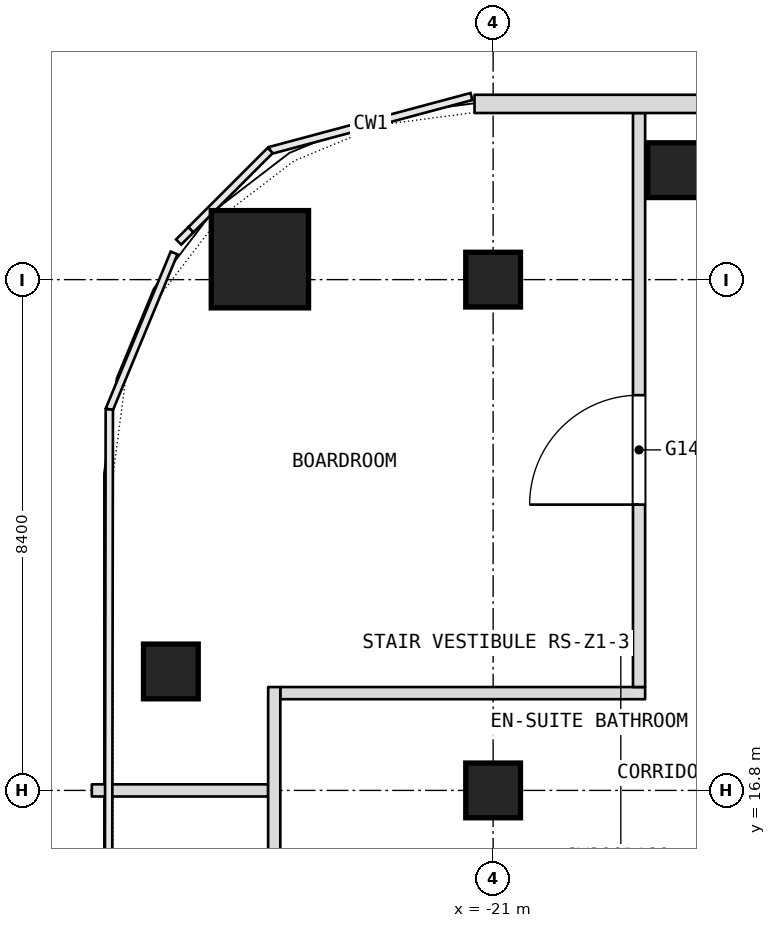
"""IFC4 building model, lengths in metres.
Left out: names, types, materials, properties, quantities, classifications, styles, units other than length and angle.
Written with IfcOpenShell. Run it as: python <this file> out.ifc"""

import sys

from ifc_helpers import new_model, si_unit, direction, frame, frame_2d, origin, origin_2d, place, context, subcontext, project, spatial, rectangle, extrude, element, fill, save


model = new_model("IFC4")
c1 = context("Model", 3, precision=1e-05, world=origin(), true_north=direction((0.0, 1.0)))
c2 = subcontext(c1, "Body", "Model", "MODEL_VIEW")
j1 = project(units=[si_unit("LENGTHUNIT", "METRE"), si_unit("PLANEANGLEUNIT", "RADIAN")], contexts=[c1])
p1 = place(None, origin())
s1 = spatial("IfcSite", under=j1, at=p1, CompositionType="ELEMENT")
p2 = place(p1, origin())
s2 = spatial("IfcBuilding", under=s1, at=p2, CompositionType="ELEMENT")
p3 = place(p2, frame((0.0, 0.0, 166.1)))
s3 = spatial("IfcBuildingStorey", under=s2, at=p3, CompositionType="ELEMENT", Elevation=166.1)
p4 = place(p3, frame((-24.835, 25.535, 0.0), z_axis=(0.0, 0.0, 1.0), x_axis=(1.0, 0.0, 0.0)))
e1 = element("IfcColumn", 1, at=p4, inside=s3, PredefinedType="COLUMN", context=c2, shape_type="SweptSolid", body=[
    extrude(rectangle(XDim=1.6, YDim=1.6, at=origin_2d()), origin(), (0.0, 0.0, 1.0), 3.6),
])
for number, where, z_axis, x_axis in (
    (2, (-21.0, 16.8, 0.0), (0.0, 0.0, 1.0), (1.0, 0.0, 0.0)),
    (3, (-21.0, 25.2, 0.0), (0.0, 0.0, 1.0), (1.0, 0.0, 0.0)),
    (4, (-26.3, 18.756, 0.0), (0.0, 0.0, 1.0), (1.0, 0.0, 0.0)),
    (5, (-18.007, 27.0, 0.0), (0.0, 0.0, 1.0), (1.0, 0.0, 0.0)),
):
    element("IfcColumn", number, at=place(p3, frame(where, z_axis=z_axis, x_axis=x_axis)), inside=s3, PredefinedType="COLUMN", context=c2, shape_type="SweptSolid", body=[
        extrude(rectangle(XDim=0.9, YDim=0.9, at=origin_2d()), origin(), (0.0, 0.0, 1.0), 3.6),
    ])
p5 = place(p3, frame((-27.6, 16.8, 0.0), z_axis=(0.0, 0.0, 1.0), x_axis=(1.0, 0.0, 0.0)))
e6 = element("IfcWall", 6, at=p5, inside=s3, PredefinedType="PARTITIONING", context=c2, shape_type="SweptSolid", body=[
    extrude(rectangle(XDim=2.9, YDim=0.2, at=frame_2d((1.45, 0.0))), origin(), (0.0, 0.0, 1.0), 2.85),
])
p6 = place(p3, frame((-24.5, 18.4, 0.0), z_axis=(0.0, 0.0, 1.0), x_axis=(1.0, 0.0, 0.0)))
e7 = element("IfcWall", 7, at=p6, inside=s3, PredefinedType="PARTITIONING", context=c2, shape_type="SweptSolid", body=[
    extrude(rectangle(XDim=6.0, YDim=0.2, at=frame_2d((3.0, 0.0))), origin(), (0.0, 0.0, 1.0), 3.3),
])
p7 = place(p3, frame((-18.6, 18.5, 0.0), z_axis=(0.0, 0.0, 1.0), x_axis=(0.0, 1.0, 0.0)))
e8 = element("IfcWall", 8, at=p7, inside=s3, PredefinedType="PARTITIONING", context=c2, shape_type="SweptSolid", body=[
    extrude(rectangle(XDim=9.44, YDim=0.2, at=frame_2d((4.72, 0.0))), origin(), (0.0, 0.0, 1.0), 3.3),
])
p8 = place(p7, frame((3.0, 0.0, 0.0)))
e9 = element("IfcOpeningElement", 9, at=p8, cuts=e8, PredefinedType="OPENING", context=c2, shape_type="SweptSolid", body=[
    extrude(rectangle(XDim=1.8, YDim=2.1, at=frame_2d((0.9, 1.05))), frame((0.0, 0.1, 0.0), z_axis=(0.0, -1.0, 0.0), x_axis=(1.0, 0.0, 0.0)), (0.0, 0.0, 1.0), 0.2),
])
p9 = place(p3, frame((-24.6, 6.9, 0.0), z_axis=(0.0, 0.0, 1.0), x_axis=(0.0, 1.0, 0.0)))
e10 = element("IfcWall", 10, at=p9, inside=s3, PredefinedType="PARTITIONING", context=c2, shape_type="SweptSolid", body=[
    extrude(rectangle(XDim=11.6, YDim=0.2, at=frame_2d((5.8, 0.0))), origin(), (0.0, 0.0, 1.0), 3.3),
])
p10 = place(p9, frame((5.45, 0.0, 0.0)))
e11 = element("IfcOpeningElement", 11, at=p10, cuts=e10, PredefinedType="OPENING", context=c2, shape_type="SweptSolid", body=[
    extrude(rectangle(XDim=1.8, YDim=2.1, at=frame_2d((0.9, 1.05))), frame((0.0, 0.1, 0.0), z_axis=(0.0, -1.0, 0.0), x_axis=(1.0, 0.0, 0.0)), (0.0, 0.0, 1.0), 0.2),
])
p11 = place(p3, frame((21.306, 28.09, 0.0), z_axis=(0.0, 0.0, 1.0), x_axis=(-1.0, 0.0, 0.0)))
e12 = element("IfcWall", 12, at=p11, inside=s3, PredefinedType="NOTDEFINED", context=c2, shape_type="SweptSolid", body=[
    extrude(rectangle(XDim=42.612, YDim=0.3, at=frame_2d((21.306, 0.0))), origin(), (0.0, 0.0, 1.0), 3.6),
])
p12 = place(p11, frame((5.406, 0.0, 0.9)))
e13 = element("IfcOpeningElement", 13, at=p12, cuts=e12, PredefinedType="OPENING", context=c2, shape_type="SweptSolid", body=[
    extrude(rectangle(XDim=2.4, YDim=2.1, at=frame_2d((1.2, 1.05))), frame((0.0, 0.15, 0.0), z_axis=(0.0, -1.0, 0.0), x_axis=(1.0, 0.0, 0.0)), (0.0, 0.0, 1.0), 0.3),
])
p13 = place(p11, frame((9.606, 0.0, 0.9)))
e14 = element("IfcOpeningElement", 14, at=p13, cuts=e12, PredefinedType="OPENING", context=c2, shape_type="SweptSolid", body=[
    extrude(rectangle(XDim=2.4, YDim=2.1, at=frame_2d((1.2, 1.05))), frame((0.0, 0.15, 0.0), z_axis=(0.0, -1.0, 0.0), x_axis=(1.0, 0.0, 0.0)), (0.0, 0.0, 1.0), 0.3),
])
p14 = place(p11, frame((13.806, 0.0, 0.9)))
e15 = element("IfcOpeningElement", 15, at=p14, cuts=e12, PredefinedType="OPENING", context=c2, shape_type="SweptSolid", body=[
    extrude(rectangle(XDim=2.4, YDim=2.1, at=frame_2d((1.2, 1.05))), frame((0.0, 0.15, 0.0), z_axis=(0.0, -1.0, 0.0), x_axis=(1.0, 0.0, 0.0)), (0.0, 0.0, 1.0), 0.3),
])
p15 = place(p11, frame((18.006, 0.0, 0.9)))
e16 = element("IfcOpeningElement", 16, at=p15, cuts=e12, PredefinedType="OPENING", context=c2, shape_type="SweptSolid", body=[
    extrude(rectangle(XDim=2.4, YDim=2.1, at=frame_2d((1.2, 1.05))), frame((0.0, 0.15, 0.0), z_axis=(0.0, -1.0, 0.0), x_axis=(1.0, 0.0, 0.0)), (0.0, 0.0, 1.0), 0.3),
])
p16 = place(p11, frame((22.206, 0.0, 0.9)))
e17 = element("IfcOpeningElement", 17, at=p16, cuts=e12, PredefinedType="OPENING", context=c2, shape_type="SweptSolid", body=[
    extrude(rectangle(XDim=2.4, YDim=2.1, at=frame_2d((1.2, 1.05))), frame((0.0, 0.15, 0.0), z_axis=(0.0, -1.0, 0.0), x_axis=(1.0, 0.0, 0.0)), (0.0, 0.0, 1.0), 0.3),
])
p17 = place(p11, frame((26.406, 0.0, 0.9)))
e18 = element("IfcOpeningElement", 18, at=p17, cuts=e12, PredefinedType="OPENING", context=c2, shape_type="SweptSolid", body=[
    extrude(rectangle(XDim=2.4, YDim=2.1, at=frame_2d((1.2, 1.05))), frame((0.0, 0.15, 0.0), z_axis=(0.0, -1.0, 0.0), x_axis=(1.0, 0.0, 0.0)), (0.0, 0.0, 1.0), 0.3),
])
p18 = place(p11, frame((30.606, 0.0, 0.9)))
e19 = element("IfcOpeningElement", 19, at=p18, cuts=e12, PredefinedType="OPENING", context=c2, shape_type="SweptSolid", body=[
    extrude(rectangle(XDim=2.4, YDim=2.1, at=frame_2d((1.2, 1.05))), frame((0.0, 0.15, 0.0), z_axis=(0.0, -1.0, 0.0), x_axis=(1.0, 0.0, 0.0)), (0.0, 0.0, 1.0), 0.3),
])
p19 = place(p11, frame((34.806, 0.0, 0.9)))
e20 = element("IfcOpeningElement", 20, at=p19, cuts=e12, PredefinedType="OPENING", context=c2, shape_type="SweptSolid", body=[
    extrude(rectangle(XDim=2.4, YDim=2.1, at=frame_2d((1.2, 1.05))), frame((0.0, 0.15, 0.0), z_axis=(0.0, -1.0, 0.0), x_axis=(1.0, 0.0, 0.0)), (0.0, 0.0, 1.0), 0.3),
])
p20 = place(p8, origin())
e21 = element("IfcDoor", 21, at=p20, inside=s3, OperationType="DOUBLE_DOOR_SINGLE_SWING", PredefinedType="DOOR", context=c2, shape_type="SweptSolid", body=[
    extrude(rectangle(XDim=1.8, YDim=2.1, at=frame_2d((0.9, 1.05))), frame((0.0, 0.025, 0.0), z_axis=(0.0, -1.0, 0.0), x_axis=(1.0, 0.0, 0.0)), (0.0, 0.0, 1.0), 0.05),
])
fill(e9, e21)
save(model, sys.argv[1])
